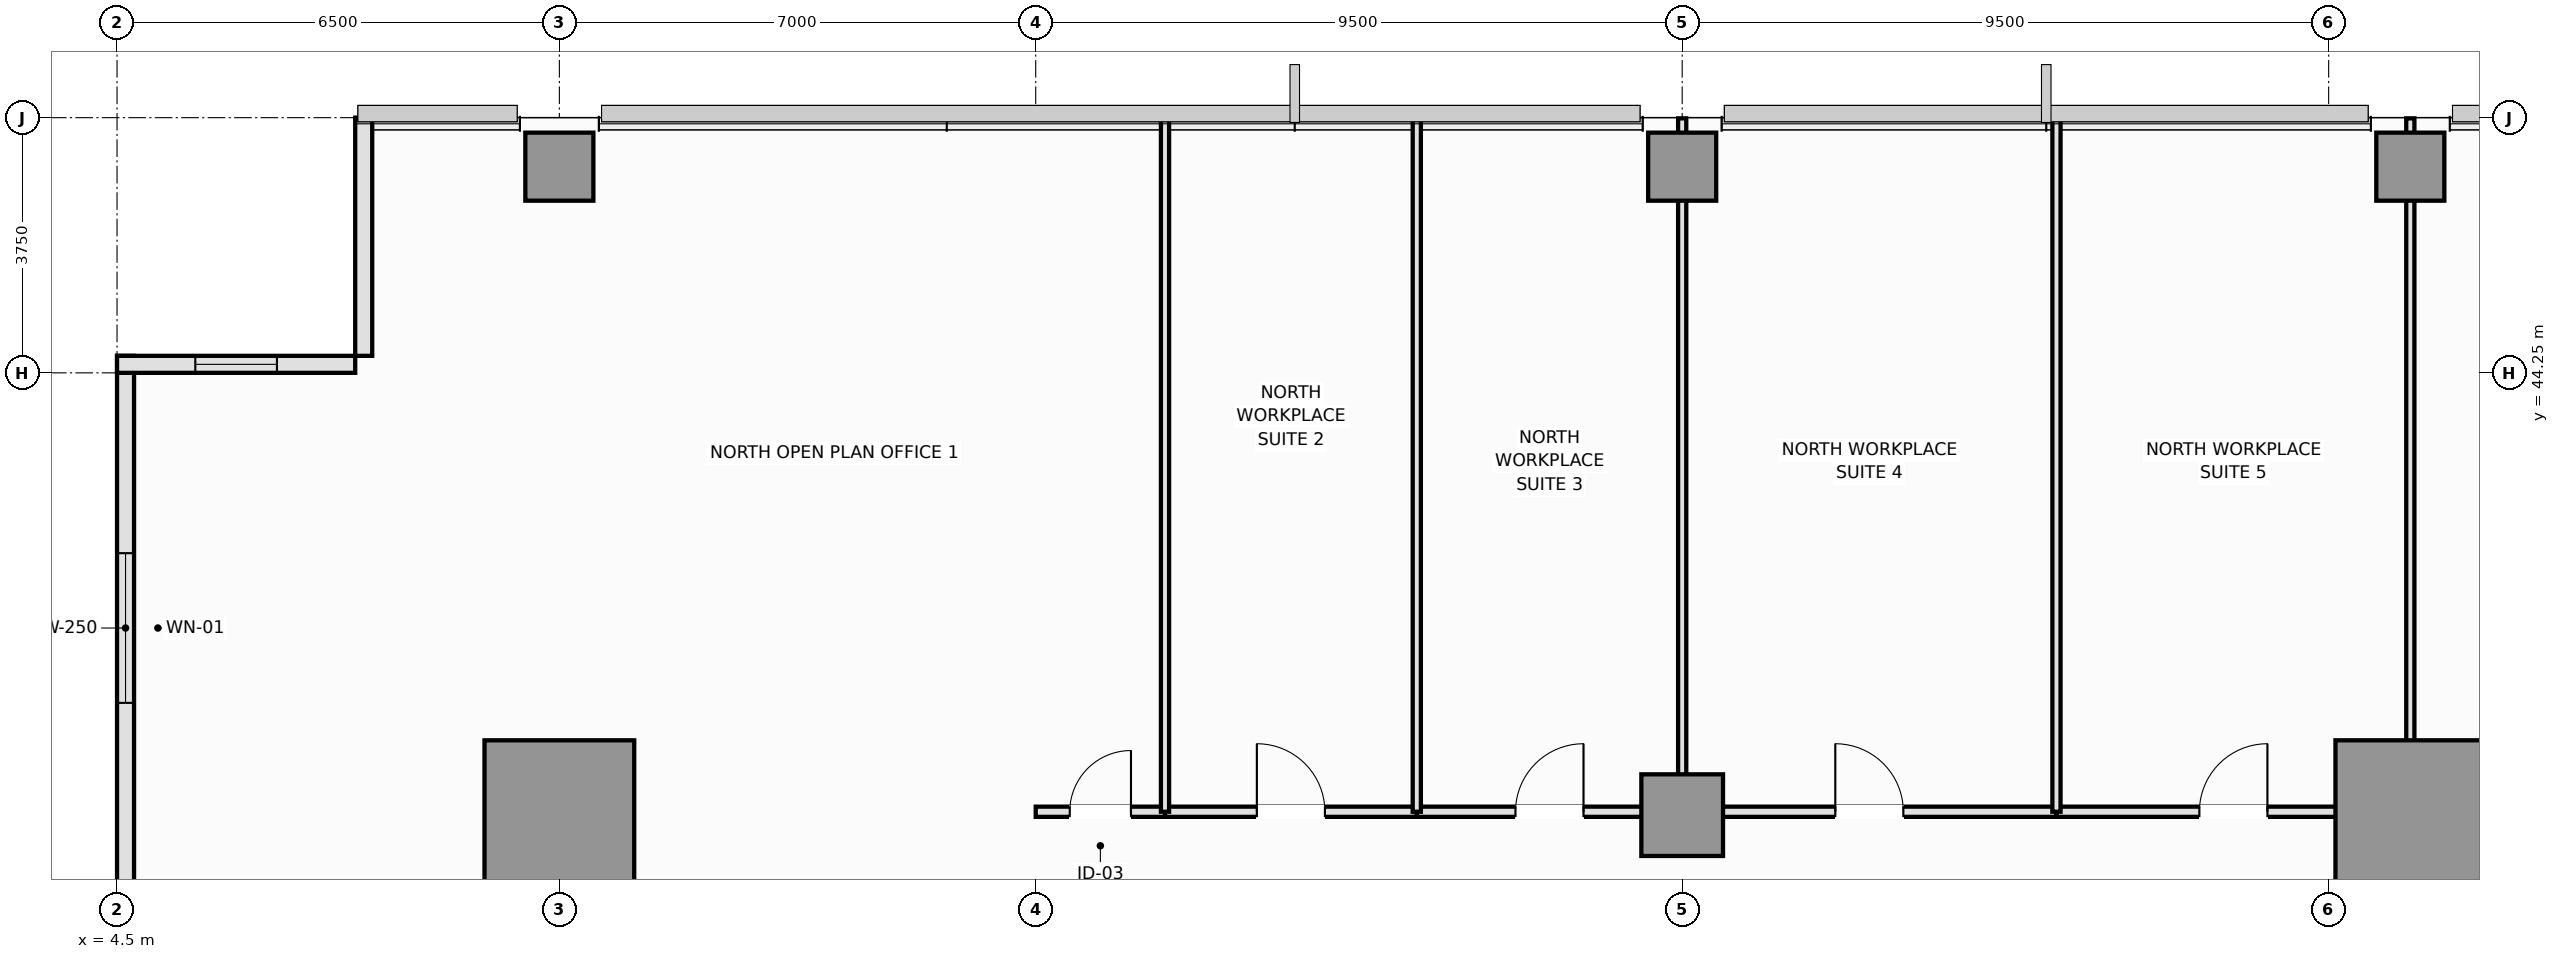
"""IFC4 building model, lengths in metres.
Left out: names, types, materials, properties, quantities, classifications, styles, units other than length and angle.
Written with IfcOpenShell. Run it as: python <this file> out.ifc"""

import sys

from ifc_helpers import new_model, si_unit, direction, frame, frame_2d, origin, origin_2d, place, context, subcontext, project, spatial, rectangle, extrude, element, fill, save


model = new_model("IFC4")
c1 = context("Model", 3, precision=1e-05, world=origin(), true_north=direction((0.0, 1.0)))
c2 = subcontext(c1, "Body", "Model", "MODEL_VIEW")
j1 = project(units=[si_unit("LENGTHUNIT", "METRE"), si_unit("PLANEANGLEUNIT", "RADIAN")], contexts=[c1])
p1 = place(None, origin())
s1 = spatial("IfcSite", under=j1, at=p1, CompositionType="ELEMENT")
p2 = place(p1, origin())
s2 = spatial("IfcBuilding", under=s1, at=p2, CompositionType="ELEMENT")
p3 = place(p2, frame((0.0, 0.0, 64.65)))
s3 = spatial("IfcBuildingStorey", under=s2, at=p3, CompositionType="ELEMENT", Elevation=64.65)
for number, where, z_axis, x_axis in (
    (1, (11.0, 37.75, 0.0), (0.0, 0.0, 1.0), (1.0, 0.0, 0.0)),
    (2, (38.2, 37.75, 0.0), (0.0, 0.0, 1.0), (1.0, 0.0, 0.0)),
):
    element("IfcColumn", number, at=place(p3, frame(where, z_axis=z_axis, x_axis=x_axis)), inside=s3, PredefinedType="COLUMN", context=c2, shape_type="SweptSolid", body=[
        extrude(rectangle(XDim=2.2, YDim=2.2, at=origin_2d()), origin(), (0.0, 0.0, 1.0), 3.55),
    ])
p4 = place(p3, frame((27.5, 37.75, 0.0), z_axis=(0.0, 0.0, 1.0), x_axis=(1.0, 0.0, 0.0)))
e3 = element("IfcColumn", 3, at=p4, inside=s3, PredefinedType="COLUMN", context=c2, shape_type="SweptSolid", body=[
    extrude(rectangle(XDim=1.2, YDim=1.2, at=origin_2d()), origin(), (0.0, 0.0, 1.0), 3.55),
])
for number, where, z_axis, x_axis in (
    (4, (11.0, 47.28, 0.0), (0.0, 0.0, 1.0), (1.0, 0.0, 0.0)),
    (5, (27.5, 47.28, 0.0), (0.0, 0.0, 1.0), (1.0, 0.0, 0.0)),
    (6, (38.2, 47.28, 0.0), (0.0, 0.0, 1.0), (1.0, 0.0, 0.0)),
):
    element("IfcColumn", number, at=place(p3, frame(where, z_axis=z_axis, x_axis=x_axis)), inside=s3, PredefinedType="COLUMN", context=c2, shape_type="SweptSolid", body=[
        extrude(rectangle(XDim=1.0, YDim=1.0, at=origin_2d()), origin(), (0.0, 0.0, 1.0), 3.55),
    ])
p5 = place(p3, frame((4.625, 44.5, 0.0), z_axis=(0.0, 0.0, 1.0), x_axis=(0.0, -1.0, 0.0)))
e7 = element("IfcWall", 7, at=p5, inside=s3, PredefinedType="SOLIDWALL", context=c2, shape_type="SweptSolid", body=[
    extrude(rectangle(XDim=8.0, YDim=0.25, at=frame_2d((4.0, 0.0))), origin(), (0.0, 0.0, 1.0), 3.37),
])
p6 = place(p5, frame((2.9, 0.0, 0.9)))
e8 = element("IfcOpeningElement", 8, at=p6, cuts=e7, PredefinedType="OPENING", context=c2, shape_type="SweptSolid", body=[
    extrude(rectangle(XDim=2.2, YDim=1.8, at=frame_2d((1.1, 0.9))), frame((0.0, 0.135, 0.0), z_axis=(0.0, -1.0, 0.0), x_axis=(1.0, 0.0, 0.0)), (0.0, 0.0, 1.0), 0.27),
])
p7 = place(p3, frame((8.125, 48.0, 0.0), z_axis=(0.0, 0.0, 1.0), x_axis=(0.0, -1.0, 0.0)))
e9 = element("IfcWall", 9, at=p7, inside=s3, PredefinedType="SOLIDWALL", context=c2, shape_type="SweptSolid", body=[
    extrude(rectangle(XDim=3.5, YDim=0.25, at=frame_2d((1.75, 0.0))), origin(), (0.0, 0.0, 1.0), 3.37),
])
p8 = place(p3, frame((8.0, 44.375, 0.0), z_axis=(0.0, 0.0, 1.0), x_axis=(-1.0, 0.0, 0.0)))
e10 = element("IfcWall", 10, at=p8, inside=s3, PredefinedType="SOLIDWALL", context=c2, shape_type="SweptSolid", body=[
    extrude(rectangle(XDim=3.5, YDim=0.25, at=frame_2d((1.75, 0.0))), origin(), (0.0, 0.0, 1.0), 3.37),
])
p9 = place(p8, frame((1.15, 0.0, 0.9)))
e11 = element("IfcOpeningElement", 11, at=p9, cuts=e10, PredefinedType="OPENING", context=c2, shape_type="SweptSolid", body=[
    extrude(rectangle(XDim=1.2, YDim=1.8, at=frame_2d((0.6, 0.9))), frame((0.0, 0.135, 0.0), z_axis=(0.0, -1.0, 0.0), x_axis=(1.0, 0.0, 0.0)), (0.0, 0.0, 1.0), 0.27),
])
p10 = place(p3, frame((18.0, 37.8, 0.0), z_axis=(0.0, 0.0, 1.0), x_axis=(1.0, 0.0, 0.0)))
e12 = element("IfcWall", 12, at=p10, inside=s3, PredefinedType="PARTITIONING", context=c2, shape_type="SweptSolid", body=[
    extrude(rectangle(XDim=1.9, YDim=0.15, at=frame_2d((0.95, 0.0))), origin(), (0.0, 0.0, 1.0), 2.72),
])
p11 = place(p10, frame((0.5, 0.0, 0.0)))
e13 = element("IfcOpeningElement", 13, at=p11, cuts=e12, PredefinedType="OPENING", context=c2, shape_type="SweptSolid", body=[
    extrude(rectangle(XDim=0.9, YDim=2.1, at=frame_2d((0.45, 1.05))), frame((0.0, 0.085, 0.0), z_axis=(0.0, -1.0, 0.0), x_axis=(1.0, 0.0, 0.0)), (0.0, 0.0, 1.0), 0.17),
])
p12 = place(p3, frame((19.9, 37.8, 0.0), z_axis=(0.0, 0.0, 1.0), x_axis=(1.0, 0.0, 0.0)))
e14 = element("IfcWall", 14, at=p12, inside=s3, PredefinedType="PARTITIONING", context=c2, shape_type="SweptSolid", body=[
    extrude(rectangle(XDim=3.7, YDim=0.15, at=frame_2d((1.85, 0.0))), origin(), (0.0, 0.0, 1.0), 2.72),
])
p13 = place(p12, frame((1.35, 0.0, 0.0)))
e15 = element("IfcOpeningElement", 15, at=p13, cuts=e14, PredefinedType="OPENING", context=c2, shape_type="SweptSolid", body=[
    extrude(rectangle(XDim=1.0, YDim=2.15, at=frame_2d((0.5, 1.075))), frame((0.0, 0.085, 0.0), z_axis=(0.0, -1.0, 0.0), x_axis=(1.0, 0.0, 0.0)), (0.0, 0.0, 1.0), 0.17),
])
p14 = place(p3, frame((23.6, 37.8, 0.0), z_axis=(0.0, 0.0, 1.0), x_axis=(1.0, 0.0, 0.0)))
e16 = element("IfcWall", 16, at=p14, inside=s3, PredefinedType="PARTITIONING", context=c2, shape_type="SweptSolid", body=[
    extrude(rectangle(XDim=3.9, YDim=0.15, at=frame_2d((1.95, 0.0))), origin(), (0.0, 0.0, 1.0), 2.72),
])
p15 = place(p14, frame((1.45, 0.0, 0.0)))
e17 = element("IfcOpeningElement", 17, at=p15, cuts=e16, PredefinedType="OPENING", context=c2, shape_type="SweptSolid", body=[
    extrude(rectangle(XDim=1.0, YDim=2.15, at=frame_2d((0.5, 1.075))), frame((0.0, 0.085, 0.0), z_axis=(0.0, -1.0, 0.0), x_axis=(1.0, 0.0, 0.0)), (0.0, 0.0, 1.0), 0.17),
])
p16 = place(p3, frame((27.5, 37.8, 0.0), z_axis=(0.0, 0.0, 1.0), x_axis=(1.0, 0.0, 0.0)))
e18 = element("IfcWall", 18, at=p16, inside=s3, PredefinedType="PARTITIONING", context=c2, shape_type="SweptSolid", body=[
    extrude(rectangle(XDim=5.5, YDim=0.15, at=frame_2d((2.75, 0.0))), origin(), (0.0, 0.0, 1.0), 2.72),
])
p17 = place(p16, frame((2.25, 0.0, 0.0)))
e19 = element("IfcOpeningElement", 19, at=p17, cuts=e18, PredefinedType="OPENING", context=c2, shape_type="SweptSolid", body=[
    extrude(rectangle(XDim=1.0, YDim=2.15, at=frame_2d((0.5, 1.075))), frame((0.0, 0.085, 0.0), z_axis=(0.0, -1.0, 0.0), x_axis=(1.0, 0.0, 0.0)), (0.0, 0.0, 1.0), 0.17),
])
p18 = place(p3, frame((33.0, 37.8, 0.0), z_axis=(0.0, 0.0, 1.0), x_axis=(1.0, 0.0, 0.0)))
e20 = element("IfcWall", 20, at=p18, inside=s3, PredefinedType="PARTITIONING", context=c2, shape_type="SweptSolid", body=[
    extrude(rectangle(XDim=5.2, YDim=0.15, at=frame_2d((2.6, 0.0))), origin(), (0.0, 0.0, 1.0), 2.72),
])
p19 = place(p18, frame((2.1, 0.0, 0.0)))
e21 = element("IfcOpeningElement", 21, at=p19, cuts=e20, PredefinedType="OPENING", context=c2, shape_type="SweptSolid", body=[
    extrude(rectangle(XDim=1.0, YDim=2.15, at=frame_2d((0.5, 1.075))), frame((0.0, 0.085, 0.0), z_axis=(0.0, -1.0, 0.0), x_axis=(1.0, 0.0, 0.0)), (0.0, 0.0, 1.0), 0.17),
])
p20 = place(p3, frame((38.2, 35.9, 0.0), z_axis=(0.0, 0.0, 1.0), x_axis=(0.0, 1.0, 0.0)))
e22 = element("IfcWall", 22, at=p20, inside=s3, PredefinedType="PARTITIONING", context=c2, shape_type="SweptSolid", body=[
    extrude(rectangle(XDim=1.9, YDim=0.15, at=frame_2d((0.95, 0.0))), origin(), (0.0, 0.0, 1.0), 2.82),
])
for number, where, z_axis, x_axis in (
    (23, (19.9, 37.8, 0.0), (0.0, 0.0, 1.0), (0.0, 1.0, 0.0)),
    (24, (23.6, 37.8, 0.0), (0.0, 0.0, 1.0), (0.0, 1.0, 0.0)),
):
    element("IfcWall", number, at=place(p3, frame(where, z_axis=z_axis, x_axis=x_axis)), inside=s3, PredefinedType="PARTITIONING", context=c2, shape_type="SweptSolid", body=[
        extrude(rectangle(XDim=10.19, YDim=0.12, at=frame_2d((5.095, 0.0))), origin(), (0.0, 0.0, 1.0), 3.37),
    ])
p21 = place(p3, frame((27.5, 37.8, 0.0), z_axis=(0.0, 0.0, 1.0), x_axis=(0.0, 1.0, 0.0)))
e25 = element("IfcWall", 25, at=p21, inside=s3, PredefinedType="PARTITIONING", context=c2, shape_type="SweptSolid", body=[
    extrude(rectangle(XDim=10.19, YDim=0.12, at=frame_2d((5.095, 0.0))), origin(), (0.0, 0.0, 1.0), 2.82),
])
p22 = place(p3, frame((33.0, 37.8, 0.0), z_axis=(0.0, 0.0, 1.0), x_axis=(0.0, 1.0, 0.0)))
e26 = element("IfcWall", 26, at=p22, inside=s3, PredefinedType="PARTITIONING", context=c2, shape_type="SweptSolid", body=[
    extrude(rectangle(XDim=10.19, YDim=0.12, at=frame_2d((5.095, 0.0))), origin(), (0.0, 0.0, 1.0), 3.37),
])
p23 = place(p3, frame((38.2, 37.8, 0.0), z_axis=(0.0, 0.0, 1.0), x_axis=(0.0, 1.0, 0.0)))
e27 = element("IfcWall", 27, at=p23, inside=s3, PredefinedType="PARTITIONING", context=c2, shape_type="SweptSolid", body=[
    extrude(rectangle(XDim=10.19, YDim=0.12, at=frame_2d((5.095, 0.0))), origin(), (0.0, 0.0, 1.0), 2.82),
])
p24 = place(p6, origin())
e28 = element("IfcWindow", 28, at=p24, inside=s3, PartitioningType="SINGLE_PANEL", PredefinedType="WINDOW", context=c2, shape_type="SweptSolid", body=[
    extrude(rectangle(XDim=2.2, YDim=1.8, at=frame_2d((1.1, 0.9))), frame((0.0, 0.03, 0.0), z_axis=(0.0, -1.0, 0.0), x_axis=(1.0, 0.0, 0.0)), (0.0, 0.0, 1.0), 0.06),
])
fill(e8, e28)
p25 = place(p9, origin())
e29 = element("IfcWindow", 29, at=p25, inside=s3, PartitioningType="SINGLE_PANEL", PredefinedType="WINDOW", context=c2, shape_type="SweptSolid", body=[
    extrude(rectangle(XDim=1.2, YDim=1.8, at=frame_2d((0.6, 0.9))), frame((0.0, 0.03, 0.0), z_axis=(0.0, -1.0, 0.0), x_axis=(1.0, 0.0, 0.0)), (0.0, 0.0, 1.0), 0.06),
])
fill(e11, e29)
p26 = place(p11, origin())
e30 = element("IfcDoor", 30, at=p26, inside=s3, OperationType="SINGLE_SWING_RIGHT", PredefinedType="DOOR", context=c2, shape_type="SweptSolid", body=[
    extrude(rectangle(XDim=0.9, YDim=2.1, at=frame_2d((0.45, 1.05))), frame((0.0, 0.025, 0.0), z_axis=(0.0, -1.0, 0.0), x_axis=(1.0, 0.0, 0.0)), (0.0, 0.0, 1.0), 0.05),
])
fill(e13, e30)
p27 = place(p13, origin())
e31 = element("IfcDoor", 31, at=p27, inside=s3, OperationType="SINGLE_SWING_LEFT", PredefinedType="DOOR", context=c2, shape_type="SweptSolid", body=[
    extrude(rectangle(XDim=1.0, YDim=2.15, at=frame_2d((0.5, 1.075))), frame((0.0, 0.025, 0.0), z_axis=(0.0, -1.0, 0.0), x_axis=(1.0, 0.0, 0.0)), (0.0, 0.0, 1.0), 0.05),
])
fill(e15, e31)
p28 = place(p15, origin())
e32 = element("IfcDoor", 32, at=p28, inside=s3, OperationType="SINGLE_SWING_RIGHT", PredefinedType="DOOR", context=c2, shape_type="SweptSolid", body=[
    extrude(rectangle(XDim=1.0, YDim=2.15, at=frame_2d((0.5, 1.075))), frame((0.0, 0.025, 0.0), z_axis=(0.0, -1.0, 0.0), x_axis=(1.0, 0.0, 0.0)), (0.0, 0.0, 1.0), 0.05),
])
fill(e17, e32)
p29 = place(p17, origin())
e33 = element("IfcDoor", 33, at=p29, inside=s3, OperationType="SINGLE_SWING_LEFT", PredefinedType="DOOR", context=c2, shape_type="SweptSolid", body=[
    extrude(rectangle(XDim=1.0, YDim=2.15, at=frame_2d((0.5, 1.075))), frame((0.0, 0.025, 0.0), z_axis=(0.0, -1.0, 0.0), x_axis=(1.0, 0.0, 0.0)), (0.0, 0.0, 1.0), 0.05),
])
fill(e19, e33)
p30 = place(p19, origin())
e34 = element("IfcDoor", 34, at=p30, inside=s3, OperationType="SINGLE_SWING_RIGHT", PredefinedType="DOOR", context=c2, shape_type="SweptSolid", body=[
    extrude(rectangle(XDim=1.0, YDim=2.15, at=frame_2d((0.5, 1.075))), frame((0.0, 0.025, 0.0), z_axis=(0.0, -1.0, 0.0), x_axis=(1.0, 0.0, 0.0)), (0.0, 0.0, 1.0), 0.05),
])
fill(e21, e34)
save(model, sys.argv[1])
